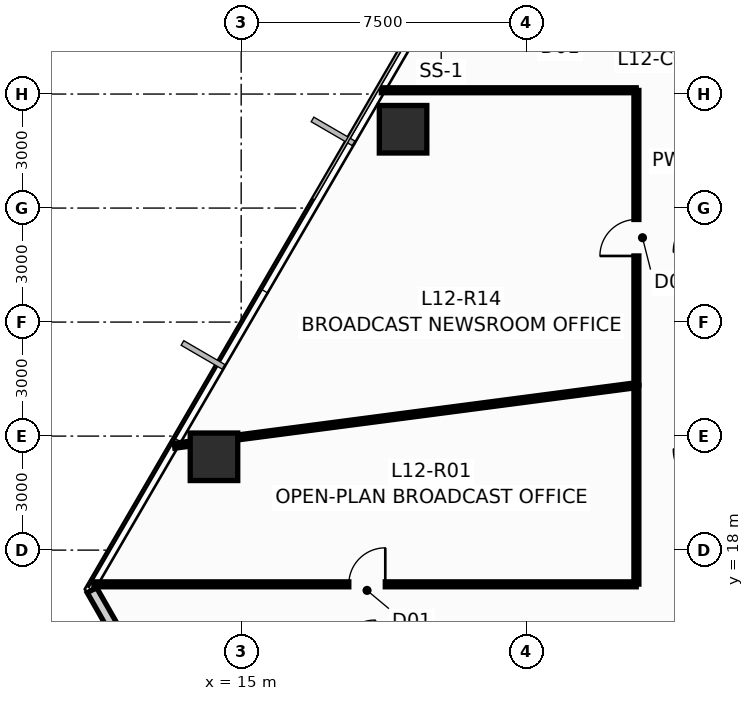
"""IFC4 building model, lengths in metres.
Left out: names, types, materials, properties, quantities, classifications, styles, units other than length and angle.
Written with IfcOpenShell. Run it as: python <this file> out.ifc"""

import sys

from ifc_helpers import new_model, si_unit, direction, frame, frame_2d, origin, origin_2d, place, context, subcontext, project, spatial, rectangle, hollow_rectangle, extrude, source, transform, mapped, element, fill, save


model = new_model("IFC4")
c1 = context("Model", 3, precision=1e-05, world=origin(), true_north=direction((0.0, 1.0)))
c2 = subcontext(c1, "Body", "Model", "MODEL_VIEW")
j1 = project(units=[si_unit("LENGTHUNIT", "METRE"), si_unit("PLANEANGLEUNIT", "RADIAN")], contexts=[c1])
p1 = place(None, origin())
s1 = spatial("IfcSite", under=j1, at=p1, CompositionType="ELEMENT")
p2 = place(p1, origin())
s2 = spatial("IfcBuilding", under=s1, at=p2, CompositionType="ELEMENT")
p3 = place(p2, frame((0.0, 0.0, 49.5)))
s3 = spatial("IfcBuildingStorey", under=s2, at=p3, CompositionType="ELEMENT", Elevation=49.5)
m1 = source(origin(), c2, "Body", "SweptSolid", [
    extrude(hollow_rectangle(XDim=1.25, YDim=1.25, WallThickness=0.07, at=origin_2d()), origin(), (0.0, 0.0, 1.0), 3.651),
])
p4 = place(p3, frame((19.26, 29.074, 0.0), z_axis=(0.014913313399, -0.013776424037, 0.999793880369), x_axis=(0.678553674548, 0.734550822447, 0.0)))
e1 = element("IfcColumn", 1, at=p4, inside=s3, PredefinedType="COLUMN", context=c2, shape_type="MappedRepresentation", body=[
    mapped(m1, transform((0.0, 0.0, 0.0), scale=1.0)),
])
m2 = source(origin(), c2, "Body", "SweptSolid", [
    extrude(hollow_rectangle(XDim=1.25, YDim=1.25, WallThickness=0.07, at=origin_2d()), origin(), (0.0, 0.0, 1.0), 3.651),
])
p5 = place(p3, frame((14.284, 20.456, 0.0), z_axis=(0.010498643418, -0.021599119899, 0.999711586662), x_axis=(0.899383059768, 0.437161425336, 0.0)))
e2 = element("IfcColumn", 2, at=p5, inside=s3, PredefinedType="COLUMN", context=c2, shape_type="MappedRepresentation", body=[
    mapped(m2, transform((0.0, 0.0, 0.0), scale=1.0)),
])
p6 = place(p3, frame((18.312, 4.275, 0.0), z_axis=(0.0, 0.0, 1.0), x_axis=(-0.496075884461, 0.868279169885, 0.0)))
e3 = element("IfcWall", 3, at=p6, inside=s3, PredefinedType="STANDARD", context=c2, shape_type="SweptSolid", body=[
    extrude(rectangle(XDim=14.594, YDim=0.28, at=frame_2d((7.297, 0.0))), origin(), (0.0, 0.0, 1.0), 3.4),
])
p7 = place(p6, frame((6.85, 0.0, 0.9)))
e4 = element("IfcOpeningElement", 4, at=p7, cuts=e3, PredefinedType="OPENING", context=c2, shape_type="SweptSolid", body=[
    extrude(rectangle(XDim=1.8, YDim=1.8, at=frame_2d((0.9, 0.9))), frame((0.0, 0.152, 0.0), z_axis=(0.0, -1.0, 0.0), x_axis=(1.0, 0.0, 0.0)), (0.0, 0.0, 1.0), 0.304),
])
p8 = place(p3, frame((11.125, 17.1, 0.0), z_axis=(0.0, 0.0, 1.0), x_axis=(1.0, 0.0, 0.0)))
e5 = element("IfcWall", 5, at=p8, inside=s3, PredefinedType="PARTITIONING", context=c2, shape_type="SweptSolid", body=[
    extrude(rectangle(XDim=14.27, YDim=0.13, at=frame_2d((7.135, 0.0))), origin(), (0.0, 0.0, 1.0), 3.4),
])
p9 = place(p8, frame((6.707, 0.0, 0.0)))
e6 = element("IfcOpeningElement", 6, at=p9, cuts=e5, PredefinedType="OPENING", context=c2, shape_type="SweptSolid", body=[
    extrude(rectangle(XDim=0.96, YDim=2.15, at=frame_2d((0.48, 1.075))), frame((0.0, 0.077, 0.0), z_axis=(0.0, -1.0, 0.0), x_axis=(1.0, 0.0, 0.0)), (0.0, 0.0, 1.0), 0.154),
])
p10 = place(p3, frame((13.247, 20.747, 0.0), z_axis=(0.0, 0.0, 1.0), x_axis=(0.991516983449, 0.129977196202, 0.0)))
e7 = element("IfcWall", 7, at=p10, inside=s3, PredefinedType="PARTITIONING", context=c2, shape_type="SweptSolid", body=[
    extrude(rectangle(XDim=12.252, YDim=0.13, at=frame_2d((6.126, 0.0))), origin(), (0.0, 0.0, 1.0), 3.4),
])
p11 = place(p3, frame((25.4, 22.345, 0.0), z_axis=(0.0, 0.0, 1.0), x_axis=(0.0, 1.0, 0.0)))
e8 = element("IfcWall", 8, at=p11, inside=s3, PredefinedType="PARTITIONING", context=c2, shape_type="SweptSolid", body=[
    extrude(rectangle(XDim=7.75, YDim=0.13, at=frame_2d((3.875, 0.0))), origin(), (0.0, 0.0, 1.0), 3.026),
])
p12 = place(p11, frame((3.395, 0.0, 0.0)))
e9 = element("IfcOpeningElement", 9, at=p12, cuts=e8, PredefinedType="OPENING", context=c2, shape_type="SweptSolid", body=[
    extrude(rectangle(XDim=0.96, YDim=2.15, at=frame_2d((0.48, 1.075))), frame((0.0, 0.077, 0.0), z_axis=(0.0, -1.0, 0.0), x_axis=(1.0, 0.0, 0.0)), (0.0, 0.0, 1.0), 0.154),
])
p13 = place(p3, frame((25.395, 30.1, 0.0), z_axis=(0.0, 0.0, 1.0), x_axis=(-1.0, 0.0, 0.0)))
e10 = element("IfcWall", 10, at=p13, inside=s3, PredefinedType="PARTITIONING", context=c2, shape_type="SweptSolid", body=[
    extrude(rectangle(XDim=6.707, YDim=0.13, at=frame_2d((3.354, 0.0))), origin(), (0.0, 0.0, 1.0), 3.4),
])
p14 = place(p3, frame((25.4, 17.105, 0.0), z_axis=(0.0, 0.0, 1.0), x_axis=(0.0, 1.0, 0.0)))
e11 = element("IfcWall", 11, at=p14, inside=s3, PredefinedType="PARTITIONING", context=c2, shape_type="SweptSolid", body=[
    extrude(rectangle(XDim=5.23, YDim=0.13, at=frame_2d((2.615, 0.0))), origin(), (0.0, 0.0, 1.0), 3.026),
])
p15 = place(p9, origin())
e12 = element("IfcDoor", 12, at=p15, inside=s3, OperationType="SINGLE_SWING_RIGHT", PredefinedType="DOOR", context=c2, shape_type="SweptSolid", body=[
    extrude(rectangle(XDim=0.96, YDim=2.15, at=frame_2d((0.48, 1.075))), frame((0.0, 0.025, 0.0), z_axis=(0.0, -1.0, 0.0), x_axis=(1.0, 0.0, 0.0)), (0.0, 0.0, 1.0), 0.05),
])
fill(e6, e12)
p16 = place(p12, origin())
e13 = element("IfcDoor", 13, at=p16, inside=s3, OperationType="SINGLE_SWING_LEFT", PredefinedType="DOOR", context=c2, shape_type="SweptSolid", body=[
    extrude(rectangle(XDim=0.96, YDim=2.15, at=frame_2d((0.48, 1.075))), frame((0.0, 0.025, 0.0), z_axis=(0.0, -1.0, 0.0), x_axis=(1.0, 0.0, 0.0)), (0.0, 0.0, 1.0), 0.05),
])
fill(e9, e13)
save(model, sys.argv[1])
